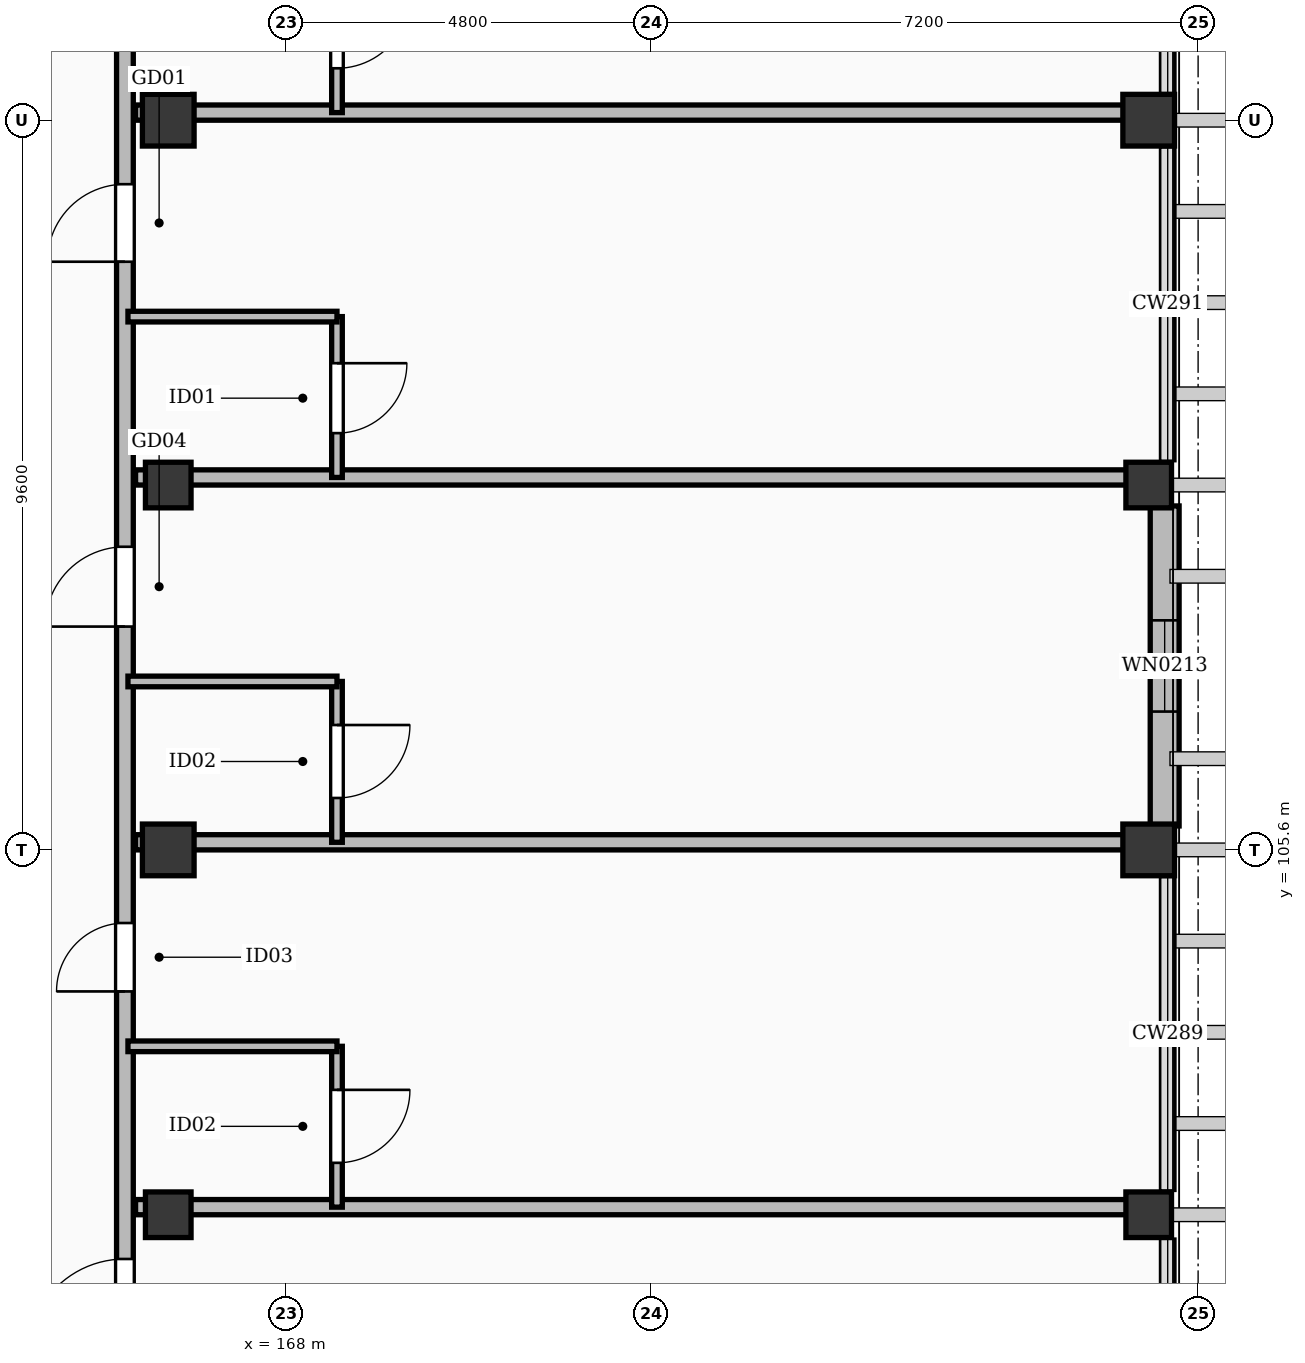
"""IFC4 building model, lengths in metres.
Left out: names, types, materials, properties, quantities, classifications, styles, units other than length and angle.
Written with IfcOpenShell. Run it as: python <this file> out.ifc"""

import sys

from ifc_helpers import new_model, si_unit, direction, frame, frame_2d, origin, origin_2d, place, context, subcontext, project, spatial, rectangle, extrude, element, fill, save


model = new_model("IFC4")
c1 = context("Model", 3, precision=1e-05, world=origin(), true_north=direction((0.0, 1.0)))
c2 = subcontext(c1, "Body", "Model", "MODEL_VIEW")
j1 = project(units=[si_unit("LENGTHUNIT", "METRE"), si_unit("PLANEANGLEUNIT", "RADIAN")], contexts=[c1])
p1 = place(None, origin())
s1 = spatial("IfcSite", under=j1, at=p1, CompositionType="ELEMENT")
p2 = place(p1, origin())
s2 = spatial("IfcBuilding", under=s1, at=p2, CompositionType="ELEMENT")
p3 = place(p2, frame((0.0, 0.0, 35.4)))
s3 = spatial("IfcBuildingStorey", under=s2, at=p3, CompositionType="ELEMENT", Elevation=35.4)
for number, where, z_axis, x_axis in (
    (1, (166.45, 105.6, 0.0), (0.0, 0.0, 1.0), (1.0, 0.0, 0.0)),
    (2, (166.45, 115.2, 0.0), (0.0, 0.0, 1.0), (1.0, 0.0, 0.0)),
    (3, (179.35, 105.6, 0.0), (0.0, 0.0, 1.0), (1.0, 0.0, 0.0)),
    (4, (179.35, 115.2, 0.0), (0.0, 0.0, 1.0), (1.0, 0.0, 0.0)),
):
    element("IfcColumn", number, at=place(p3, frame(where, z_axis=z_axis, x_axis=x_axis)), inside=s3, PredefinedType="COLUMN", context=c2, shape_type="SweptSolid", body=[
        extrude(rectangle(XDim=0.68, YDim=0.68, at=origin_2d()), origin(), (0.0, 0.0, 1.0), 3.6),
    ])
for number, where, z_axis, x_axis in (
    (5, (166.45, 100.8, 0.0), (0.0, 0.0, 1.0), (1.0, 0.0, 0.0)),
    (6, (166.45, 110.4, 0.0), (0.0, 0.0, 1.0), (1.0, 0.0, 0.0)),
    (7, (179.35, 100.8, 0.0), (0.0, 0.0, 1.0), (1.0, 0.0, 0.0)),
    (8, (179.35, 110.4, 0.0), (0.0, 0.0, 1.0), (1.0, 0.0, 0.0)),
):
    element("IfcColumn", number, at=place(p3, frame(where, z_axis=z_axis, x_axis=x_axis)), inside=s3, PredefinedType="COLUMN", context=c2, shape_type="SweptSolid", body=[
        extrude(rectangle(XDim=0.6, YDim=0.6, at=origin_2d()), origin(), (0.0, 0.0, 1.0), 3.6),
    ])
p4 = place(p3, frame((179.56, 110.125, 0.0), z_axis=(0.0, 0.0, 1.0), x_axis=(0.0, -1.0, 0.0)))
e9 = element("IfcWall", 9, at=p4, inside=s3, PredefinedType="SOLIDWALL", context=c2, shape_type="SweptSolid", body=[
    extrude(rectangle(XDim=4.21, YDim=0.38, at=frame_2d((2.105, 0.0))), origin(), (0.0, 0.0, 1.0), 2.602),
])
p5 = place(p4, frame((1.505, 0.0, 0.55)))
e10 = element("IfcOpeningElement", 10, at=p5, cuts=e9, PredefinedType="OPENING", context=c2, shape_type="SweptSolid", body=[
    extrude(rectangle(XDim=1.2, YDim=1.72, at=frame_2d((0.6, 0.86))), frame((0.0, 0.202, 0.0), z_axis=(0.0, -1.0, 0.0), x_axis=(1.0, 0.0, 0.0)), (0.0, 0.0, 1.0), 0.404),
])
p6 = place(p3, frame((165.88, 53.15, 0.0), z_axis=(0.0, 0.0, 1.0), x_axis=(0.0, 1.0, 0.0)))
e11 = element("IfcWall", 11, at=p6, inside=s3, PredefinedType="PARTITIONING", context=c2, shape_type="SweptSolid", body=[
    extrude(rectangle(XDim=72.5, YDim=0.22, at=frame_2d((36.25, 0.0))), origin(), (0.0, 0.0, 1.0), 2.602),
])
p7 = place(p6, frame((0.691, 0.0, 0.0)))
e12 = element("IfcOpeningElement", 12, at=p7, cuts=e11, PredefinedType="OPENING", context=c2, shape_type="SweptSolid", body=[
    extrude(rectangle(XDim=1.02, YDim=2.2, at=frame_2d((0.51, 1.1))), frame((0.0, 0.122, 0.0), z_axis=(0.0, -1.0, 0.0), x_axis=(1.0, 0.0, 0.0)), (0.0, 0.0, 1.0), 0.244),
])
p8 = place(p6, frame((7.388, 0.0, 0.0)))
e13 = element("IfcOpeningElement", 13, at=p8, cuts=e11, PredefinedType="OPENING", context=c2, shape_type="SweptSolid", body=[
    extrude(rectangle(XDim=1.14, YDim=2.26, at=frame_2d((0.57, 1.13))), frame((0.0, 0.122, 0.0), z_axis=(0.0, -1.0, 0.0), x_axis=(1.0, 0.0, 0.0)), (0.0, 0.0, 1.0), 0.244),
])
p9 = place(p6, frame((12.188, 0.0, 0.0)))
e14 = element("IfcOpeningElement", 14, at=p9, cuts=e11, PredefinedType="OPENING", context=c2, shape_type="SweptSolid", body=[
    extrude(rectangle(XDim=0.98, YDim=2.15, at=frame_2d((0.49, 1.075))), frame((0.0, 0.122, 0.0), z_axis=(0.0, -1.0, 0.0), x_axis=(1.0, 0.0, 0.0)), (0.0, 0.0, 1.0), 0.244),
])
p10 = place(p6, frame((16.988, 0.0, 0.0)))
e15 = element("IfcOpeningElement", 15, at=p10, cuts=e11, PredefinedType="OPENING", context=c2, shape_type="SweptSolid", body=[
    extrude(rectangle(XDim=1.28, YDim=2.16, at=frame_2d((0.64, 1.08))), frame((0.0, 0.122, 0.0), z_axis=(0.0, -1.0, 0.0), x_axis=(1.0, 0.0, 0.0)), (0.0, 0.0, 1.0), 0.244),
])
p11 = place(p6, frame((21.788, 0.0, 0.0)))
e16 = element("IfcOpeningElement", 16, at=p11, cuts=e11, PredefinedType="OPENING", context=c2, shape_type="SweptSolid", body=[
    extrude(rectangle(XDim=0.9, YDim=2.08, at=frame_2d((0.45, 1.04))), frame((0.0, 0.122, 0.0), z_axis=(0.0, -1.0, 0.0), x_axis=(1.0, 0.0, 0.0)), (0.0, 0.0, 1.0), 0.244),
])
p12 = place(p6, frame((26.588, 0.0, 0.0)))
e17 = element("IfcOpeningElement", 17, at=p12, cuts=e11, PredefinedType="OPENING", context=c2, shape_type="SweptSolid", body=[
    extrude(rectangle(XDim=1.05, YDim=2.22, at=frame_2d((0.525, 1.11))), frame((0.0, 0.122, 0.0), z_axis=(0.0, -1.0, 0.0), x_axis=(1.0, 0.0, 0.0)), (0.0, 0.0, 1.0), 0.244),
])
p13 = place(p6, frame((31.388, 0.0, 0.0)))
e18 = element("IfcOpeningElement", 18, at=p13, cuts=e11, PredefinedType="OPENING", context=c2, shape_type="SweptSolid", body=[
    extrude(rectangle(XDim=1.02, YDim=2.2, at=frame_2d((0.51, 1.1))), frame((0.0, 0.122, 0.0), z_axis=(0.0, -1.0, 0.0), x_axis=(1.0, 0.0, 0.0)), (0.0, 0.0, 1.0), 0.244),
])
p14 = place(p6, frame((36.188, 0.0, 0.0)))
e19 = element("IfcOpeningElement", 19, at=p14, cuts=e11, PredefinedType="OPENING", context=c2, shape_type="SweptSolid", body=[
    extrude(rectangle(XDim=1.14, YDim=2.26, at=frame_2d((0.57, 1.13))), frame((0.0, 0.122, 0.0), z_axis=(0.0, -1.0, 0.0), x_axis=(1.0, 0.0, 0.0)), (0.0, 0.0, 1.0), 0.244),
])
p15 = place(p6, frame((40.988, 0.0, 0.0)))
e20 = element("IfcOpeningElement", 20, at=p15, cuts=e11, PredefinedType="OPENING", context=c2, shape_type="SweptSolid", body=[
    extrude(rectangle(XDim=0.98, YDim=2.15, at=frame_2d((0.49, 1.075))), frame((0.0, 0.122, 0.0), z_axis=(0.0, -1.0, 0.0), x_axis=(1.0, 0.0, 0.0)), (0.0, 0.0, 1.0), 0.244),
])
p16 = place(p6, frame((45.788, 0.0, 0.0)))
e21 = element("IfcOpeningElement", 21, at=p16, cuts=e11, PredefinedType="OPENING", context=c2, shape_type="SweptSolid", body=[
    extrude(rectangle(XDim=1.28, YDim=2.16, at=frame_2d((0.64, 1.08))), frame((0.0, 0.122, 0.0), z_axis=(0.0, -1.0, 0.0), x_axis=(1.0, 0.0, 0.0)), (0.0, 0.0, 1.0), 0.244),
])
p17 = place(p6, frame((50.588, 0.0, 0.0)))
e22 = element("IfcOpeningElement", 22, at=p17, cuts=e11, PredefinedType="OPENING", context=c2, shape_type="SweptSolid", body=[
    extrude(rectangle(XDim=0.9, YDim=2.08, at=frame_2d((0.45, 1.04))), frame((0.0, 0.122, 0.0), z_axis=(0.0, -1.0, 0.0), x_axis=(1.0, 0.0, 0.0)), (0.0, 0.0, 1.0), 0.244),
])
p18 = place(p6, frame((55.388, 0.0, 0.0)))
e23 = element("IfcOpeningElement", 23, at=p18, cuts=e11, PredefinedType="OPENING", context=c2, shape_type="SweptSolid", body=[
    extrude(rectangle(XDim=1.05, YDim=2.22, at=frame_2d((0.525, 1.11))), frame((0.0, 0.122, 0.0), z_axis=(0.0, -1.0, 0.0), x_axis=(1.0, 0.0, 0.0)), (0.0, 0.0, 1.0), 0.244),
])
p19 = place(p6, frame((60.188, 0.0, 0.0)))
e24 = element("IfcOpeningElement", 24, at=p19, cuts=e11, PredefinedType="OPENING", context=c2, shape_type="SweptSolid", body=[
    extrude(rectangle(XDim=1.02, YDim=2.2, at=frame_2d((0.51, 1.1))), frame((0.0, 0.122, 0.0), z_axis=(0.0, -1.0, 0.0), x_axis=(1.0, 0.0, 0.0)), (0.0, 0.0, 1.0), 0.244),
])
p20 = place(p6, frame((64.988, 0.0, 0.0)))
e25 = element("IfcOpeningElement", 25, at=p20, cuts=e11, PredefinedType="OPENING", context=c2, shape_type="SweptSolid", body=[
    extrude(rectangle(XDim=1.14, YDim=2.26, at=frame_2d((0.57, 1.13))), frame((0.0, 0.122, 0.0), z_axis=(0.0, -1.0, 0.0), x_axis=(1.0, 0.0, 0.0)), (0.0, 0.0, 1.0), 0.244),
])
p21 = place(p6, frame((69.788, 0.0, 0.0)))
e26 = element("IfcOpeningElement", 26, at=p21, cuts=e11, PredefinedType="OPENING", context=c2, shape_type="SweptSolid", body=[
    extrude(rectangle(XDim=0.98, YDim=2.15, at=frame_2d((0.49, 1.075))), frame((0.0, 0.122, 0.0), z_axis=(0.0, -1.0, 0.0), x_axis=(1.0, 0.0, 0.0)), (0.0, 0.0, 1.0), 0.244),
])
p22 = place(p3, frame((166.02, 100.9, 0.0), z_axis=(0.0, 0.0, 1.0), x_axis=(1.0, 0.0, 0.0)))
e27 = element("IfcWall", 27, at=p22, inside=s3, PredefinedType="PARTITIONING", context=c2, shape_type="SweptSolid", body=[
    extrude(rectangle(XDim=13.23, YDim=0.2, at=frame_2d((6.615, 0.0))), origin(), (0.0, 0.0, 1.0), 2.602),
])
p23 = place(p3, frame((168.67, 100.9, 0.0), z_axis=(0.0, 0.0, 1.0), x_axis=(0.0, 1.0, 0.0)))
e28 = element("IfcWall", 28, at=p23, inside=s3, PredefinedType="PARTITIONING", context=c2, shape_type="SweptSolid", body=[
    extrude(rectangle(XDim=2.116, YDim=0.14, at=frame_2d((1.058, 0.0))), origin(), (0.0, 0.0, 1.0), 2.732),
])
p24 = place(p23, frame((0.583, 0.0, 0.0)))
e29 = element("IfcOpeningElement", 29, at=p24, cuts=e28, PredefinedType="OPENING", context=c2, shape_type="SweptSolid", body=[
    extrude(rectangle(XDim=0.96, YDim=2.12, at=frame_2d((0.48, 1.06))), frame((0.0, 0.082, 0.0), z_axis=(0.0, -1.0, 0.0), x_axis=(1.0, 0.0, 0.0)), (0.0, 0.0, 1.0), 0.164),
])
p25 = place(p3, frame((165.92, 103.016, 0.0), z_axis=(0.0, 0.0, 1.0), x_axis=(1.0, 0.0, 0.0)))
e30 = element("IfcWall", 30, at=p25, inside=s3, PredefinedType="PARTITIONING", context=c2, shape_type="SweptSolid", body=[
    extrude(rectangle(XDim=2.75, YDim=0.14, at=frame_2d((1.375, 0.0))), origin(), (0.0, 0.0, 1.0), 2.732),
])
p26 = place(p3, frame((166.02, 105.7, 0.0), z_axis=(0.0, 0.0, 1.0), x_axis=(1.0, 0.0, 0.0)))
e31 = element("IfcWall", 31, at=p26, inside=s3, PredefinedType="PARTITIONING", context=c2, shape_type="SweptSolid", body=[
    extrude(rectangle(XDim=13.23, YDim=0.2, at=frame_2d((6.615, 0.0))), origin(), (0.0, 0.0, 1.0), 2.602),
])
p27 = place(p3, frame((168.67, 105.7, 0.0), z_axis=(0.0, 0.0, 1.0), x_axis=(0.0, 1.0, 0.0)))
e32 = element("IfcWall", 32, at=p27, inside=s3, PredefinedType="PARTITIONING", context=c2, shape_type="SweptSolid", body=[
    extrude(rectangle(XDim=2.116, YDim=0.14, at=frame_2d((1.058, 0.0))), origin(), (0.0, 0.0, 1.0), 2.732),
])
p28 = place(p27, frame((0.583, 0.0, 0.0)))
e33 = element("IfcOpeningElement", 33, at=p28, cuts=e32, PredefinedType="OPENING", context=c2, shape_type="SweptSolid", body=[
    extrude(rectangle(XDim=0.96, YDim=2.12, at=frame_2d((0.48, 1.06))), frame((0.0, 0.082, 0.0), z_axis=(0.0, -1.0, 0.0), x_axis=(1.0, 0.0, 0.0)), (0.0, 0.0, 1.0), 0.164),
])
p29 = place(p3, frame((165.92, 107.816, 0.0), z_axis=(0.0, 0.0, 1.0), x_axis=(1.0, 0.0, 0.0)))
e34 = element("IfcWall", 34, at=p29, inside=s3, PredefinedType="PARTITIONING", context=c2, shape_type="SweptSolid", body=[
    extrude(rectangle(XDim=2.75, YDim=0.14, at=frame_2d((1.375, 0.0))), origin(), (0.0, 0.0, 1.0), 2.732),
])
p30 = place(p3, frame((166.02, 110.5, 0.0), z_axis=(0.0, 0.0, 1.0), x_axis=(1.0, 0.0, 0.0)))
e35 = element("IfcWall", 35, at=p30, inside=s3, PredefinedType="PARTITIONING", context=c2, shape_type="SweptSolid", body=[
    extrude(rectangle(XDim=13.23, YDim=0.2, at=frame_2d((6.615, 0.0))), origin(), (0.0, 0.0, 1.0), 2.602),
])
p31 = place(p3, frame((168.67, 110.5, 0.0), z_axis=(0.0, 0.0, 1.0), x_axis=(0.0, 1.0, 0.0)))
e36 = element("IfcWall", 36, at=p31, inside=s3, PredefinedType="PARTITIONING", context=c2, shape_type="SweptSolid", body=[
    extrude(rectangle(XDim=2.116, YDim=0.14, at=frame_2d((1.058, 0.0))), origin(), (0.0, 0.0, 1.0), 2.732),
])
p32 = place(p31, frame((0.583, 0.0, 0.0)))
e37 = element("IfcOpeningElement", 37, at=p32, cuts=e36, PredefinedType="OPENING", context=c2, shape_type="SweptSolid", body=[
    extrude(rectangle(XDim=0.92, YDim=2.1, at=frame_2d((0.46, 1.05))), frame((0.0, 0.082, 0.0), z_axis=(0.0, -1.0, 0.0), x_axis=(1.0, 0.0, 0.0)), (0.0, 0.0, 1.0), 0.164),
])
p33 = place(p3, frame((165.92, 112.616, 0.0), z_axis=(0.0, 0.0, 1.0), x_axis=(1.0, 0.0, 0.0)))
e38 = element("IfcWall", 38, at=p33, inside=s3, PredefinedType="PARTITIONING", context=c2, shape_type="SweptSolid", body=[
    extrude(rectangle(XDim=2.75, YDim=0.14, at=frame_2d((1.375, 0.0))), origin(), (0.0, 0.0, 1.0), 2.732),
])
p34 = place(p3, frame((166.02, 115.3, 0.0), z_axis=(0.0, 0.0, 1.0), x_axis=(1.0, 0.0, 0.0)))
e39 = element("IfcWall", 39, at=p34, inside=s3, PredefinedType="PARTITIONING", context=c2, shape_type="SweptSolid", body=[
    extrude(rectangle(XDim=13.23, YDim=0.2, at=frame_2d((6.615, 0.0))), origin(), (0.0, 0.0, 1.0), 2.602),
])
p35 = place(p3, frame((168.67, 115.3, 0.0), z_axis=(0.0, 0.0, 1.0), x_axis=(0.0, 1.0, 0.0)))
e40 = element("IfcWall", 40, at=p35, inside=s3, PredefinedType="PARTITIONING", context=c2, shape_type="SweptSolid", body=[
    extrude(rectangle(XDim=2.116, YDim=0.14, at=frame_2d((1.058, 0.0))), origin(), (0.0, 0.0, 1.0), 2.732),
])
p36 = place(p35, frame((0.583, 0.0, 0.0)))
e41 = element("IfcOpeningElement", 41, at=p36, cuts=e40, PredefinedType="OPENING", context=c2, shape_type="SweptSolid", body=[
    extrude(rectangle(XDim=0.96, YDim=2.12, at=frame_2d((0.48, 1.06))), frame((0.0, 0.082, 0.0), z_axis=(0.0, -1.0, 0.0), x_axis=(1.0, 0.0, 0.0)), (0.0, 0.0, 1.0), 0.164),
])
p37 = place(p5, origin())
e42 = element("IfcWindow", 42, at=p37, inside=s3, PartitioningType="SINGLE_PANEL", PredefinedType="WINDOW", context=c2, shape_type="SweptSolid", body=[
    extrude(rectangle(XDim=1.2, YDim=1.72, at=frame_2d((0.6, 0.86))), frame((0.0, 0.03, 0.0), z_axis=(0.0, -1.0, 0.0), x_axis=(1.0, 0.0, 0.0)), (0.0, 0.0, 1.0), 0.06),
])
fill(e10, e42)
p38 = place(p16, origin())
e43 = element("IfcDoor", 43, at=p38, inside=s3, OperationType="SINGLE_SWING_LEFT", PredefinedType="DOOR", context=c2, shape_type="SweptSolid", body=[
    extrude(rectangle(XDim=1.28, YDim=2.16, at=frame_2d((0.64, 1.08))), frame((0.0, 0.025, 0.0), z_axis=(0.0, -1.0, 0.0), x_axis=(1.0, 0.0, 0.0)), (0.0, 0.0, 1.0), 0.05),
])
fill(e21, e43)
p39 = place(p17, origin())
e44 = element("IfcDoor", 44, at=p39, inside=s3, OperationType="SINGLE_SWING_LEFT", PredefinedType="DOOR", context=c2, shape_type="SweptSolid", body=[
    extrude(rectangle(XDim=0.9, YDim=2.08, at=frame_2d((0.45, 1.04))), frame((0.0, 0.025, 0.0), z_axis=(0.0, -1.0, 0.0), x_axis=(1.0, 0.0, 0.0)), (0.0, 0.0, 1.0), 0.05),
])
fill(e22, e44)
p40 = place(p24, frame((0.96, 0.0, 0.0), z_axis=(0.0, 0.0, 1.0), x_axis=(-1.0, 0.0, 0.0)))
e45 = element("IfcDoor", 45, at=p40, inside=s3, OperationType="SINGLE_SWING_RIGHT", PredefinedType="DOOR", context=c2, shape_type="SweptSolid", body=[
    extrude(rectangle(XDim=0.96, YDim=2.12, at=frame_2d((0.48, 1.06))), frame((0.0, 0.025, 0.0), z_axis=(0.0, -1.0, 0.0), x_axis=(1.0, 0.0, 0.0)), (0.0, 0.0, 1.0), 0.05),
])
fill(e29, e45)
p41 = place(p18, origin())
e46 = element("IfcDoor", 46, at=p41, inside=s3, OperationType="SINGLE_SWING_LEFT", PredefinedType="DOOR", context=c2, shape_type="SweptSolid", body=[
    extrude(rectangle(XDim=1.05, YDim=2.22, at=frame_2d((0.525, 1.11))), frame((0.0, 0.025, 0.0), z_axis=(0.0, -1.0, 0.0), x_axis=(1.0, 0.0, 0.0)), (0.0, 0.0, 1.0), 0.05),
])
fill(e23, e46)
p42 = place(p28, frame((0.96, 0.0, 0.0), z_axis=(0.0, 0.0, 1.0), x_axis=(-1.0, 0.0, 0.0)))
e47 = element("IfcDoor", 47, at=p42, inside=s3, OperationType="SINGLE_SWING_RIGHT", PredefinedType="DOOR", context=c2, shape_type="SweptSolid", body=[
    extrude(rectangle(XDim=0.96, YDim=2.12, at=frame_2d((0.48, 1.06))), frame((0.0, 0.025, 0.0), z_axis=(0.0, -1.0, 0.0), x_axis=(1.0, 0.0, 0.0)), (0.0, 0.0, 1.0), 0.05),
])
fill(e33, e47)
p43 = place(p19, origin())
e48 = element("IfcDoor", 48, at=p43, inside=s3, OperationType="SINGLE_SWING_LEFT", PredefinedType="DOOR", context=c2, shape_type="SweptSolid", body=[
    extrude(rectangle(XDim=1.02, YDim=2.2, at=frame_2d((0.51, 1.1))), frame((0.0, 0.025, 0.0), z_axis=(0.0, -1.0, 0.0), x_axis=(1.0, 0.0, 0.0)), (0.0, 0.0, 1.0), 0.05),
])
fill(e24, e48)
p44 = place(p32, frame((0.92, 0.0, 0.0), z_axis=(0.0, 0.0, 1.0), x_axis=(-1.0, 0.0, 0.0)))
e49 = element("IfcDoor", 49, at=p44, inside=s3, OperationType="SINGLE_SWING_RIGHT", PredefinedType="DOOR", context=c2, shape_type="SweptSolid", body=[
    extrude(rectangle(XDim=0.92, YDim=2.1, at=frame_2d((0.46, 1.05))), frame((0.0, 0.025, 0.0), z_axis=(0.0, -1.0, 0.0), x_axis=(1.0, 0.0, 0.0)), (0.0, 0.0, 1.0), 0.05),
])
fill(e37, e49)
p45 = place(p36, frame((0.96, 0.0, 0.0), z_axis=(0.0, 0.0, 1.0), x_axis=(-1.0, 0.0, 0.0)))
e50 = element("IfcDoor", 50, at=p45, inside=s3, OperationType="SINGLE_SWING_RIGHT", PredefinedType="DOOR", context=c2, shape_type="SweptSolid", body=[
    extrude(rectangle(XDim=0.96, YDim=2.12, at=frame_2d((0.48, 1.06))), frame((0.0, 0.025, 0.0), z_axis=(0.0, -1.0, 0.0), x_axis=(1.0, 0.0, 0.0)), (0.0, 0.0, 1.0), 0.05),
])
fill(e41, e50)
save(model, sys.argv[1])
